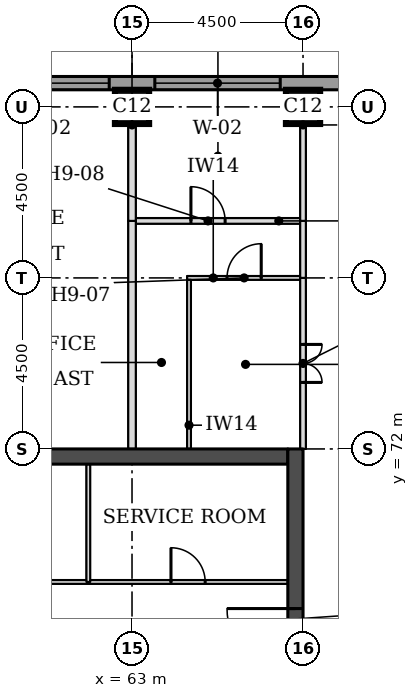
"""IFC4 building model, lengths in metres.
Left out: names, types, materials, properties, quantities, classifications, styles, units other than length and angle.
Written with IfcOpenShell. Run it as: python <this file> out.ifc"""

import sys

from ifc_helpers import new_model, si_unit, direction, frame, frame_2d, origin, origin_2d, place, context, subcontext, project, spatial, rectangle, extrude, element, fill, save


model = new_model("IFC4")
c1 = context("Model", 3, precision=1e-05, world=origin(), true_north=direction((0.0, 1.0)))
c2 = subcontext(c1, "Body", "Model", "MODEL_VIEW")
j1 = project(units=[si_unit("LENGTHUNIT", "METRE"), si_unit("PLANEANGLEUNIT", "RADIAN")], contexts=[c1])
p1 = place(None, origin())
s1 = spatial("IfcSite", under=j1, at=p1, CompositionType="ELEMENT")
p2 = place(p1, origin())
s2 = spatial("IfcBuilding", under=s1, at=p2, CompositionType="ELEMENT")
p3 = place(p2, frame((0.0, 0.0, 211.9)))
s3 = spatial("IfcBuildingStorey", under=s2, at=p3, CompositionType="ELEMENT", Elevation=211.9)
for number, where, z_axis, x_axis in (
    (1, (63.0, 81.0, 0.0), (0.0, 0.0, 1.0), (1.0, 0.0, 0.0)),
    (2, (67.5, 81.0, 0.0), (0.0, 0.0, 1.0), (1.0, 0.0, 0.0)),
):
    element("IfcColumn", number, at=place(p3, frame(where, z_axis=z_axis, x_axis=x_axis)), inside=s3, PredefinedType="COLUMN", context=c2, shape_type="SweptSolid", body=[
        extrude(rectangle(XDim=0.9, YDim=0.9, at=origin_2d()), origin(), (0.0, 0.0, 1.0), 3.7),
    ])
p4 = place(p3, frame((45.4, 71.8, 0.0), z_axis=(0.0, 0.0, 1.0), x_axis=(1.0, 0.0, 0.0)))
e3 = element("IfcWall", 3, at=p4, inside=s3, PredefinedType="SHEAR", context=c2, shape_type="SweptSolid", body=[
    extrude(rectangle(XDim=21.7, YDim=0.4, at=frame_2d((10.85, 0.0))), origin(), (0.0, 0.0, 1.0), 3.7),
])
p5 = place(p3, frame((67.3, 49.5, 0.0), z_axis=(0.0, 0.0, 1.0), x_axis=(0.0, 1.0, 0.0)))
e4 = element("IfcWall", 4, at=p5, inside=s3, PredefinedType="SHEAR", context=c2, shape_type="SweptSolid", body=[
    extrude(rectangle(XDim=22.5, YDim=0.4, at=frame_2d((11.25, 0.0))), origin(), (0.0, 0.0, 1.0), 3.7),
])
p6 = place(p5, frame((4.2, 0.0, 0.0)))
e5 = element("IfcOpeningElement", 5, at=p6, cuts=e4, PredefinedType="OPENING", context=c2, shape_type="SweptSolid", body=[
    extrude(rectangle(XDim=1.8, YDim=2.1, at=frame_2d((0.9, 1.05))), frame((0.0, 0.21, 0.0), z_axis=(0.0, -1.0, 0.0), x_axis=(1.0, 0.0, 0.0)), (0.0, 0.0, 1.0), 0.42),
])
p7 = place(p5, frame((6.9, 0.0, 0.0)))
e6 = element("IfcOpeningElement", 6, at=p7, cuts=e4, PredefinedType="OPENING", context=c2, shape_type="SweptSolid", body=[
    extrude(rectangle(XDim=1.1, YDim=2.1, at=frame_2d((0.55, 1.05))), frame((0.0, 0.21, 0.0), z_axis=(0.0, -1.0, 0.0), x_axis=(1.0, 0.0, 0.0)), (0.0, 0.0, 1.0), 0.42),
])
p8 = place(p5, frame((13.6, 0.0, 0.0)))
e7 = element("IfcOpeningElement", 7, at=p8, cuts=e4, PredefinedType="OPENING", context=c2, shape_type="SweptSolid", body=[
    extrude(rectangle(XDim=1.1, YDim=2.1, at=frame_2d((0.55, 1.05))), frame((0.0, 0.21, 0.0), z_axis=(0.0, -1.0, 0.0), x_axis=(1.0, 0.0, 0.0)), (0.0, 0.0, 1.0), 0.42),
])
p9 = place(p5, frame((16.5, 0.0, 0.0)))
e8 = element("IfcOpeningElement", 8, at=p9, cuts=e4, PredefinedType="OPENING", context=c2, shape_type="SweptSolid", body=[
    extrude(rectangle(XDim=1.8, YDim=2.1, at=frame_2d((0.9, 1.05))), frame((0.0, 0.21, 0.0), z_axis=(0.0, -1.0, 0.0), x_axis=(1.0, 0.0, 0.0)), (0.0, 0.0, 1.0), 0.42),
])
p10 = place(p3, frame((72.331, 81.625, 0.0), z_axis=(0.0, 0.0, 1.0), x_axis=(-1.0, 0.0, 0.0)))
e9 = element("IfcWall", 9, at=p10, inside=s3, PredefinedType="STANDARD", context=c2, shape_type="SweptSolid", body=[
    extrude(rectangle(XDim=32.163, YDim=0.35, at=frame_2d((16.081, 0.0))), origin(), (0.0, 0.0, 1.0), 3.525),
])
p11 = place(p10, frame((5.431, 0.0, 0.9)))
e10 = element("IfcOpeningElement", 10, at=p11, cuts=e9, PredefinedType="OPENING", context=c2, shape_type="SweptSolid", body=[
    extrude(rectangle(XDim=3.3, YDim=1.9, at=frame_2d((1.65, 0.95))), frame((0.0, 0.185, 0.0), z_axis=(0.0, -1.0, 0.0), x_axis=(1.0, 0.0, 0.0)), (0.0, 0.0, 1.0), 0.37),
])
p12 = place(p10, frame((9.931, 0.0, 0.9)))
e11 = element("IfcOpeningElement", 11, at=p12, cuts=e9, PredefinedType="OPENING", context=c2, shape_type="SweptSolid", body=[
    extrude(rectangle(XDim=3.3, YDim=1.9, at=frame_2d((1.65, 0.95))), frame((0.0, 0.185, 0.0), z_axis=(0.0, -1.0, 0.0), x_axis=(1.0, 0.0, 0.0)), (0.0, 0.0, 1.0), 0.37),
])
p13 = place(p10, frame((14.431, 0.0, 0.9)))
e12 = element("IfcOpeningElement", 12, at=p13, cuts=e9, PredefinedType="OPENING", context=c2, shape_type="SweptSolid", body=[
    extrude(rectangle(XDim=3.3, YDim=1.9, at=frame_2d((1.65, 0.95))), frame((0.0, 0.185, 0.0), z_axis=(0.0, -1.0, 0.0), x_axis=(1.0, 0.0, 0.0)), (0.0, 0.0, 1.0), 0.37),
])
p14 = place(p10, frame((18.931, 0.0, 0.9)))
e13 = element("IfcOpeningElement", 13, at=p14, cuts=e9, PredefinedType="OPENING", context=c2, shape_type="SweptSolid", body=[
    extrude(rectangle(XDim=3.3, YDim=1.9, at=frame_2d((1.65, 0.95))), frame((0.0, 0.185, 0.0), z_axis=(0.0, -1.0, 0.0), x_axis=(1.0, 0.0, 0.0)), (0.0, 0.0, 1.0), 0.37),
])
p15 = place(p10, frame((23.431, 0.0, 0.9)))
e14 = element("IfcOpeningElement", 14, at=p15, cuts=e9, PredefinedType="OPENING", context=c2, shape_type="SweptSolid", body=[
    extrude(rectangle(XDim=3.3, YDim=1.9, at=frame_2d((1.65, 0.95))), frame((0.0, 0.185, 0.0), z_axis=(0.0, -1.0, 0.0), x_axis=(1.0, 0.0, 0.0)), (0.0, 0.0, 1.0), 0.37),
])
p16 = place(p3, frame((64.45, 76.5, 0.0), z_axis=(0.0, 0.0, 1.0), x_axis=(1.0, 0.0, 0.0)))
e15 = element("IfcWall", 15, at=p16, inside=s3, PredefinedType="PARTITIONING", context=c2, shape_type="SweptSolid", body=[
    extrude(rectangle(XDim=2.975, YDim=0.1, at=frame_2d((1.488, 0.0))), origin(), (0.0, 0.0, 1.0), 3.55),
])
p17 = place(p16, frame((1.05, 0.0, 0.0)))
e16 = element("IfcOpeningElement", 16, at=p17, cuts=e15, PredefinedType="OPENING", context=c2, shape_type="SweptSolid", body=[
    extrude(rectangle(XDim=0.9, YDim=2.1, at=frame_2d((0.45, 1.05))), frame((0.0, 0.06, 0.0), z_axis=(0.0, -1.0, 0.0), x_axis=(1.0, 0.0, 0.0)), (0.0, 0.0, 1.0), 0.12),
])
p18 = place(p3, frame((63.1, 78.0, 0.0), z_axis=(0.0, 0.0, 1.0), x_axis=(1.0, 0.0, 0.0)))
e17 = element("IfcWall", 17, at=p18, inside=s3, PredefinedType="PARTITIONING", context=c2, shape_type="SweptSolid", body=[
    extrude(rectangle(XDim=4.325, YDim=0.15, at=frame_2d((2.163, 0.0))), origin(), (0.0, 0.0, 1.0), 3.55),
])
p19 = place(p18, frame((1.45, 0.0, 0.0)))
e18 = element("IfcOpeningElement", 18, at=p19, cuts=e17, PredefinedType="OPENING", context=c2, shape_type="SweptSolid", body=[
    extrude(rectangle(XDim=0.9, YDim=2.1, at=frame_2d((0.45, 1.05))), frame((0.0, 0.085, 0.0), z_axis=(0.0, -1.0, 0.0), x_axis=(1.0, 0.0, 0.0)), (0.0, 0.0, 1.0), 0.17),
])
p20 = place(p3, frame((63.0, 72.0, 0.0), z_axis=(0.0, 0.0, 1.0), x_axis=(0.0, 1.0, 0.0)))
e19 = element("IfcWall", 19, at=p20, inside=s3, PredefinedType="PARTITIONING", context=c2, shape_type="SweptSolid", body=[
    extrude(rectangle(XDim=6.0, YDim=0.2, at=frame_2d((3.0, 0.0))), origin(), (0.0, 0.0, 1.0), 3.55),
])
p21 = place(p3, frame((64.5, 72.0, 0.0), z_axis=(0.0, 0.0, 1.0), x_axis=(0.0, 1.0, 0.0)))
e20 = element("IfcWall", 20, at=p21, inside=s3, PredefinedType="PARTITIONING", context=c2, shape_type="SweptSolid", body=[
    extrude(rectangle(XDim=4.45, YDim=0.1, at=frame_2d((2.225, 0.0))), origin(), (0.0, 0.0, 1.0), 3.55),
])
p22 = place(p3, frame((67.5, 72.0, 0.0), z_axis=(0.0, 0.0, 1.0), x_axis=(0.0, 1.0, 0.0)))
e21 = element("IfcWall", 21, at=p22, inside=s3, PredefinedType="PARTITIONING", context=c2, shape_type="SweptSolid", body=[
    extrude(rectangle(XDim=4.5, YDim=0.15, at=frame_2d((2.25, 0.0))), origin(), (0.0, 0.0, 1.0), 3.022),
])
p23 = place(p22, frame((1.75, 0.0, 0.0)))
e22 = element("IfcOpeningElement", 22, at=p23, cuts=e21, PredefinedType="OPENING", context=c2, shape_type="SweptSolid", body=[
    extrude(rectangle(XDim=1.0, YDim=2.1, at=frame_2d((0.5, 1.05))), frame((0.0, 0.085, 0.0), z_axis=(0.0, -1.0, 0.0), x_axis=(1.0, 0.0, 0.0)), (0.0, 0.0, 1.0), 0.17),
])
p24 = place(p3, frame((67.5, 76.5, 0.0), z_axis=(0.0, 0.0, 1.0), x_axis=(0.0, 1.0, 0.0)))
e23 = element("IfcWall", 23, at=p24, inside=s3, PredefinedType="PARTITIONING", context=c2, shape_type="SweptSolid", body=[
    extrude(rectangle(XDim=1.5, YDim=0.15, at=frame_2d((0.75, 0.0))), origin(), (0.0, 0.0, 1.0), 3.022),
])
p25 = place(p3, frame((63.0, 78.0, 0.0), z_axis=(0.0, 0.0, 1.0), x_axis=(0.0, 1.0, 0.0)))
e24 = element("IfcWall", 24, at=p25, inside=s3, PredefinedType="PARTITIONING", context=c2, shape_type="SweptSolid", body=[
    extrude(rectangle(XDim=3.45, YDim=0.2, at=frame_2d((1.725, 0.0))), origin(), (0.0, 0.0, 1.0), 3.55),
])
p26 = place(p3, frame((67.5, 78.0, 0.0), z_axis=(0.0, 0.0, 1.0), x_axis=(0.0, 1.0, 0.0)))
e25 = element("IfcWall", 25, at=p26, inside=s3, PredefinedType="PARTITIONING", context=c2, shape_type="SweptSolid", body=[
    extrude(rectangle(XDim=3.45, YDim=0.15, at=frame_2d((1.725, 0.0))), origin(), (0.0, 0.0, 1.0), 3.022),
])
p27 = place(p3, frame((45.4, 68.5, 0.0), z_axis=(0.0, 0.0, 1.0), x_axis=(1.0, 0.0, 0.0)))
e26 = element("IfcWall", 26, at=p27, inside=s3, PredefinedType="PARTITIONING", context=c2, shape_type="SweptSolid", body=[
    extrude(rectangle(XDim=21.7, YDim=0.1, at=frame_2d((10.85, 0.0))), origin(), (0.0, 0.0, 1.0), 3.55),
])
p28 = place(p27, frame((18.625, 0.0, 0.0)))
e27 = element("IfcOpeningElement", 27, at=p28, cuts=e26, PredefinedType="OPENING", context=c2, shape_type="SweptSolid", body=[
    extrude(rectangle(XDim=0.9, YDim=2.1, at=frame_2d((0.45, 1.05))), frame((0.0, 0.06, 0.0), z_axis=(0.0, -1.0, 0.0), x_axis=(1.0, 0.0, 0.0)), (0.0, 0.0, 1.0), 0.12),
])
p29 = place(p27, frame((1.073, 0.0, 0.0)))
e28 = element("IfcOpeningElement", 28, at=p29, cuts=e26, PredefinedType="OPENING", context=c2, shape_type="SweptSolid", body=[
    extrude(rectangle(XDim=0.9, YDim=2.1, at=frame_2d((0.45, 1.05))), frame((0.0, 0.06, 0.0), z_axis=(0.0, -1.0, 0.0), x_axis=(1.0, 0.0, 0.0)), (0.0, 0.0, 1.0), 0.12),
])
p30 = place(p27, frame((3.698, 0.0, 0.0)))
e29 = element("IfcOpeningElement", 29, at=p30, cuts=e26, PredefinedType="OPENING", context=c2, shape_type="SweptSolid", body=[
    extrude(rectangle(XDim=0.9, YDim=2.1, at=frame_2d((0.45, 1.05))), frame((0.0, 0.06, 0.0), z_axis=(0.0, -1.0, 0.0), x_axis=(1.0, 0.0, 0.0)), (0.0, 0.0, 1.0), 0.12),
])
p31 = place(p27, frame((14.32, 0.0, 0.0)))
e30 = element("IfcOpeningElement", 30, at=p31, cuts=e26, PredefinedType="OPENING", context=c2, shape_type="SweptSolid", body=[
    extrude(rectangle(XDim=0.9, YDim=2.1, at=frame_2d((0.45, 1.05))), frame((0.0, 0.06, 0.0), z_axis=(0.0, -1.0, 0.0), x_axis=(1.0, 0.0, 0.0)), (0.0, 0.0, 1.0), 0.12),
])
p32 = place(p27, frame((10.848, 0.0, 0.0)))
e31 = element("IfcOpeningElement", 31, at=p32, cuts=e26, PredefinedType="OPENING", context=c2, shape_type="SweptSolid", body=[
    extrude(rectangle(XDim=0.9, YDim=2.1, at=frame_2d((0.45, 1.05))), frame((0.0, 0.06, 0.0), z_axis=(0.0, -1.0, 0.0), x_axis=(1.0, 0.0, 0.0)), (0.0, 0.0, 1.0), 0.12),
])
p33 = place(p27, frame((6.928, 0.0, 0.0)))
e32 = element("IfcOpeningElement", 32, at=p33, cuts=e26, PredefinedType="OPENING", context=c2, shape_type="SweptSolid", body=[
    extrude(rectangle(XDim=0.9, YDim=2.1, at=frame_2d((0.45, 1.05))), frame((0.0, 0.06, 0.0), z_axis=(0.0, -1.0, 0.0), x_axis=(1.0, 0.0, 0.0)), (0.0, 0.0, 1.0), 0.12),
])
p34 = place(p3, frame((61.85, 68.5, 0.0), z_axis=(0.0, 0.0, 1.0), x_axis=(0.0, 1.0, 0.0)))
e33 = element("IfcWall", 33, at=p34, inside=s3, PredefinedType="PARTITIONING", context=c2, shape_type="SweptSolid", body=[
    extrude(rectangle(XDim=3.1, YDim=0.1, at=frame_2d((1.55, 0.0))), origin(), (0.0, 0.0, 1.0), 3.55),
])
p35 = place(p11, origin())
e34 = element("IfcWindow", 34, at=p35, inside=s3, PartitioningType="SINGLE_PANEL", PredefinedType="WINDOW", context=c2, shape_type="SweptSolid", body=[
    extrude(rectangle(XDim=3.3, YDim=1.9, at=frame_2d((1.65, 0.95))), frame((0.0, 0.085, 0.0), z_axis=(0.0, -1.0, 0.0), x_axis=(1.0, 0.0, 0.0)), (0.0, 0.0, 1.0), 0.06),
])
fill(e10, e34)
p36 = place(p12, origin())
e35 = element("IfcWindow", 35, at=p36, inside=s3, PartitioningType="SINGLE_PANEL", PredefinedType="WINDOW", context=c2, shape_type="SweptSolid", body=[
    extrude(rectangle(XDim=3.3, YDim=1.9, at=frame_2d((1.65, 0.95))), frame((0.0, 0.085, 0.0), z_axis=(0.0, -1.0, 0.0), x_axis=(1.0, 0.0, 0.0)), (0.0, 0.0, 1.0), 0.06),
])
fill(e11, e35)
p37 = place(p23, frame((1.0, 0.0, 0.0), z_axis=(0.0, 0.0, 1.0), x_axis=(-1.0, 0.0, 0.0)))
e36 = element("IfcDoor", 36, at=p37, inside=s3, OperationType="DOUBLE_DOOR_SINGLE_SWING", PredefinedType="DOOR", context=c2, shape_type="SweptSolid", body=[
    extrude(rectangle(XDim=1.0, YDim=2.1, at=frame_2d((0.5, 1.05))), frame((0.0, 0.025, 0.0), z_axis=(0.0, -1.0, 0.0), x_axis=(1.0, 0.0, 0.0)), (0.0, 0.0, 1.0), 0.05),
])
fill(e22, e36)
p38 = place(p17, origin())
e37 = element("IfcDoor", 37, at=p38, inside=s3, OperationType="SINGLE_SWING_RIGHT", PredefinedType="DOOR", context=c2, shape_type="SweptSolid", body=[
    extrude(rectangle(XDim=0.9, YDim=2.1, at=frame_2d((0.45, 1.05))), frame((0.0, 0.025, 0.0), z_axis=(0.0, -1.0, 0.0), x_axis=(1.0, 0.0, 0.0)), (0.0, 0.0, 1.0), 0.05),
])
fill(e16, e37)
p39 = place(p19, origin())
e38 = element("IfcDoor", 38, at=p39, inside=s3, OperationType="SINGLE_SWING_LEFT", PredefinedType="DOOR", context=c2, shape_type="SweptSolid", body=[
    extrude(rectangle(XDim=0.9, YDim=2.1, at=frame_2d((0.45, 1.05))), frame((0.0, 0.025, 0.0), z_axis=(0.0, -1.0, 0.0), x_axis=(1.0, 0.0, 0.0)), (0.0, 0.0, 1.0), 0.05),
])
fill(e18, e38)
p40 = place(p9, origin())
e39 = element("IfcDoor", 39, at=p40, inside=s3, OperationType="SINGLE_SWING_RIGHT", PredefinedType="DOOR", context=c2, shape_type="SweptSolid", body=[
    extrude(rectangle(XDim=1.8, YDim=2.1, at=frame_2d((0.9, 1.05))), frame((0.0, 0.025, 0.0), z_axis=(0.0, -1.0, 0.0), x_axis=(1.0, 0.0, 0.0)), (0.0, 0.0, 1.0), 0.05),
])
fill(e8, e39)
p41 = place(p28, origin())
e40 = element("IfcDoor", 40, at=p41, inside=s3, OperationType="SINGLE_SWING_LEFT", PredefinedType="DOOR", context=c2, shape_type="SweptSolid", body=[
    extrude(rectangle(XDim=0.9, YDim=2.1, at=frame_2d((0.45, 1.05))), frame((0.0, 0.025, 0.0), z_axis=(0.0, -1.0, 0.0), x_axis=(1.0, 0.0, 0.0)), (0.0, 0.0, 1.0), 0.05),
])
fill(e27, e40)
save(model, sys.argv[1])
